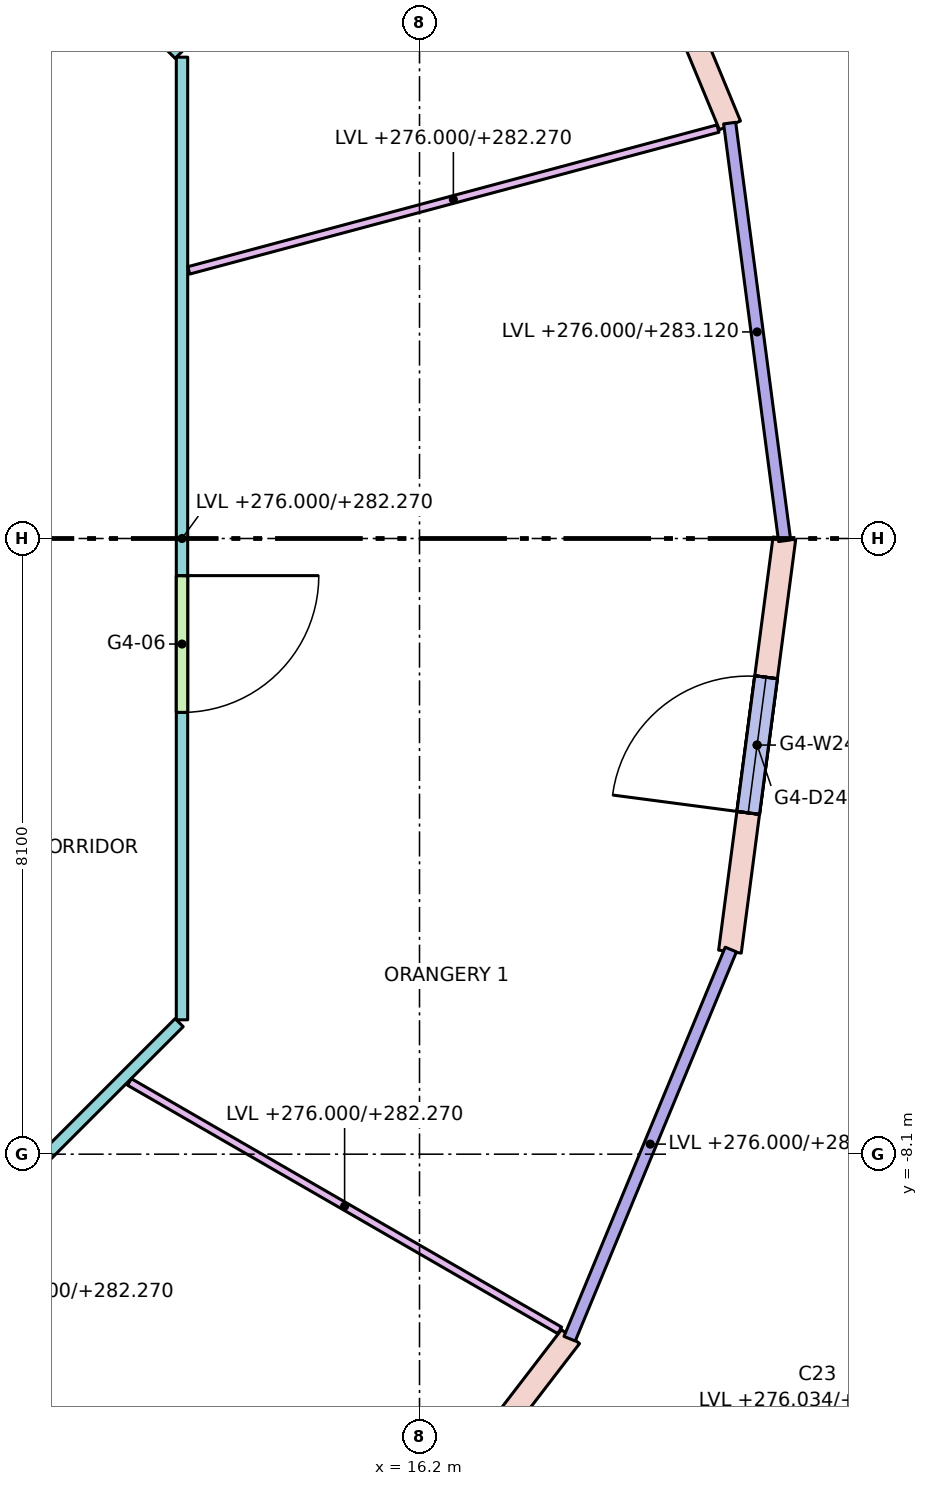
"""IFC4 building model, lengths in metres.
Left out: names, types, materials, properties, quantities, classifications, styles, units other than length and angle.
Written with IfcOpenShell. Run it as: python <this file> out.ifc"""

import sys

from ifc_helpers import new_model, si_unit, direction, frame, frame_2d, origin, place, context, subcontext, project, spatial, rectangle, extrude, element, fill, save


model = new_model("IFC4")
c1 = context("Model", 3, precision=1e-05, world=origin(), true_north=direction((0.0, 1.0)))
c2 = subcontext(c1, "Body", "Model", "MODEL_VIEW")
j1 = project(units=[si_unit("LENGTHUNIT", "METRE"), si_unit("PLANEANGLEUNIT", "RADIAN")], contexts=[c1])
p1 = place(None, origin())
s1 = spatial("IfcSite", under=j1, at=p1, CompositionType="ELEMENT")
p2 = place(p1, origin())
s2 = spatial("IfcBuilding", under=s1, at=p2, CompositionType="ELEMENT")
p3 = place(p2, frame((0.0, 0.0, 276.0)))
s3 = spatial("IfcBuildingStorey", under=s2, at=p3, CompositionType="ELEMENT", Elevation=276.0)
p4 = place(p3, frame((20.284, 5.435, 0.0), z_axis=(0.0, 0.0, 1.0), x_axis=(-0.382688740813, 0.923877333662, 0.0)))
e1 = element("IfcWall", 1, at=p4, inside=s3, PredefinedType="STANDARD", context=c2, shape_type="SweptSolid", body=[
    extrude(rectangle(XDim=5.482, YDim=0.3, at=frame_2d((2.741, 0.0))), origin(), (0.0, 0.0, 1.0), 7.12),
])
p5 = place(p4, frame((1.841, 0.0, 0.0)))
e2 = element("IfcOpeningElement", 2, at=p5, cuts=e1, PredefinedType="OPENING", context=c2, shape_type="SweptSolid", body=[
    extrude(rectangle(XDim=1.8, YDim=2.4, at=frame_2d((0.9, 1.2))), frame((0.0, 0.16, 0.0), z_axis=(0.0, -1.0, 0.0), x_axis=(1.0, 0.0, 0.0)), (0.0, 0.0, 1.0), 0.32),
])
p6 = place(p4, frame((1.841, 0.0, 2.8)))
e3 = element("IfcOpeningElement", 3, at=p6, cuts=e1, PredefinedType="OPENING", context=c2, shape_type="SweptSolid", body=[
    extrude(rectangle(XDim=1.8, YDim=4.1, at=frame_2d((0.9, 2.05))), frame((0.0, 0.16, 0.0), z_axis=(0.0, -1.0, 0.0), x_axis=(1.0, 0.0, 0.0)), (0.0, 0.0, 1.0), 0.32),
])
p7 = place(p3, frame((14.849, -14.849, 0.0), z_axis=(0.0, 0.0, 1.0), x_axis=(0.608784891166, 0.793335336593, 0.0)))
e4 = element("IfcWall", 4, at=p7, inside=s3, PredefinedType="STANDARD", context=c2, shape_type="SweptSolid", body=[
    extrude(rectangle(XDim=5.482, YDim=0.3, at=frame_2d((2.741, 0.0))), origin(), (0.0, 0.0, 1.0), 7.12),
])
p8 = place(p7, frame((1.841, 0.0, 0.0)))
e5 = element("IfcOpeningElement", 5, at=p8, cuts=e4, PredefinedType="OPENING", context=c2, shape_type="SweptSolid", body=[
    extrude(rectangle(XDim=1.8, YDim=2.4, at=frame_2d((0.9, 1.2))), frame((0.0, 0.16, 0.0), z_axis=(0.0, -1.0, 0.0), x_axis=(1.0, 0.0, 0.0)), (0.0, 0.0, 1.0), 0.32),
])
p9 = place(p7, frame((1.841, 0.0, 2.8)))
e6 = element("IfcOpeningElement", 6, at=p9, cuts=e4, PredefinedType="OPENING", context=c2, shape_type="SweptSolid", body=[
    extrude(rectangle(XDim=1.8, YDim=4.1, at=frame_2d((0.9, 2.05))), frame((0.0, 0.16, 0.0), z_axis=(0.0, -1.0, 0.0), x_axis=(1.0, 0.0, 0.0)), (0.0, 0.0, 1.0), 0.32),
])
p10 = place(p3, frame((20.284, -5.435, 0.0), z_axis=(0.0, 0.0, 1.0), x_axis=(0.130527087244, 0.991444743541, 0.0)))
e7 = element("IfcWall", 7, at=p10, inside=s3, PredefinedType="STANDARD", context=c2, shape_type="SweptSolid", body=[
    extrude(rectangle(XDim=5.482, YDim=0.3, at=frame_2d((2.741, 0.0))), origin(), (0.0, 0.0, 1.0), 7.12),
])
p11 = place(p10, frame((1.841, 0.0, 0.0)))
e8 = element("IfcOpeningElement", 8, at=p11, cuts=e7, PredefinedType="OPENING", context=c2, shape_type="SweptSolid", body=[
    extrude(rectangle(XDim=1.8, YDim=2.4, at=frame_2d((0.9, 1.2))), frame((0.0, 0.16, 0.0), z_axis=(0.0, -1.0, 0.0), x_axis=(1.0, 0.0, 0.0)), (0.0, 0.0, 1.0), 0.32),
])
p12 = place(p10, frame((1.841, 0.0, 2.8)))
e9 = element("IfcOpeningElement", 9, at=p12, cuts=e7, PredefinedType="OPENING", context=c2, shape_type="SweptSolid", body=[
    extrude(rectangle(XDim=1.8, YDim=4.1, at=frame_2d((0.9, 2.05))), frame((0.0, 0.16, 0.0), z_axis=(0.0, -1.0, 0.0), x_axis=(1.0, 0.0, 0.0)), (0.0, 0.0, 1.0), 0.32),
])
p13 = place(p3, frame((13.038, -6.369, 0.0), z_axis=(0.0, 0.0, 1.0), x_axis=(-0.707106781187, -0.707106781187, 0.0)))
e10 = element("IfcWall", 10, at=p13, inside=s3, PredefinedType="PARTITIONING", context=c2, shape_type="SweptSolid", body=[
    extrude(rectangle(XDim=6.602, YDim=0.15, at=frame_2d((3.301, 0.0))), origin(), (0.0, 0.0, 1.0), 6.27),
])
p14 = place(p13, frame((3.344, 0.0, 0.0)))
e11 = element("IfcOpeningElement", 11, at=p14, cuts=e10, PredefinedType="OPENING", context=c2, shape_type="SweptSolid", body=[
    extrude(rectangle(XDim=0.9, YDim=2.1, at=frame_2d((0.45, 1.05))), frame((0.0, 0.085, 0.0), z_axis=(0.0, -1.0, 0.0), x_axis=(1.0, 0.0, 0.0)), (0.0, 0.0, 1.0), 0.17),
])
p15 = place(p3, frame((8.369, 11.038, 0.0), z_axis=(0.0, 0.0, 1.0), x_axis=(0.707106781187, -0.707106781187, 0.0)))
e12 = element("IfcWall", 12, at=p15, inside=s3, PredefinedType="PARTITIONING", context=c2, shape_type="SweptSolid", body=[
    extrude(rectangle(XDim=6.602, YDim=0.15, at=frame_2d((3.301, 0.0))), origin(), (0.0, 0.0, 1.0), 6.27),
])
p16 = place(p15, frame((3.719, 0.0, 0.0)))
e13 = element("IfcOpeningElement", 13, at=p16, cuts=e12, PredefinedType="OPENING", context=c2, shape_type="SweptSolid", body=[
    extrude(rectangle(XDim=1.0, YDim=2.1, at=frame_2d((0.5, 1.05))), frame((0.0, 0.085, 0.0), z_axis=(0.0, -1.0, 0.0), x_axis=(1.0, 0.0, 0.0)), (0.0, 0.0, 1.0), 0.17),
])
p17 = place(p3, frame((13.075, 6.332, 0.0), z_axis=(0.0, 0.0, 1.0), x_axis=(0.0, -1.0, 0.0)))
e14 = element("IfcWall", 14, at=p17, inside=s3, PredefinedType="PARTITIONING", context=c2, shape_type="SweptSolid", body=[
    extrude(rectangle(XDim=12.665, YDim=0.15, at=frame_2d((6.332, 0.0))), origin(), (0.0, 0.0, 1.0), 6.27),
])
p18 = place(p17, frame((6.821, 0.0, 0.0)))
e15 = element("IfcOpeningElement", 15, at=p18, cuts=e14, PredefinedType="OPENING", context=c2, shape_type="SweptSolid", body=[
    extrude(rectangle(XDim=1.8, YDim=2.1, at=frame_2d((0.9, 1.05))), frame((0.0, 0.085, 0.0), z_axis=(0.0, -1.0, 0.0), x_axis=(1.0, 0.0, 0.0)), (0.0, 0.0, 1.0), 0.17),
])
p19 = place(p3, frame((13.164, 3.527, 0.0), z_axis=(0.0, 0.0, 1.0), x_axis=(0.965929002199, 0.258807192153, 0.0)))
e16 = element("IfcWall", 16, at=p19, inside=s3, PredefinedType="PARTITIONING", context=c2, shape_type="SweptSolid", body=[
    extrude(rectangle(XDim=7.208, YDim=0.1, at=frame_2d((3.604, 0.0))), origin(), (0.0, 0.0, 1.0), 6.27),
])
p20 = place(p3, frame((12.384, -7.15, 0.0), z_axis=(0.0, 0.0, 1.0), x_axis=(0.866028240128, -0.499995087276, 0.0)))
e17 = element("IfcWall", 17, at=p20, inside=s3, PredefinedType="PARTITIONING", context=c2, shape_type="SweptSolid", body=[
    extrude(rectangle(XDim=6.537, YDim=0.1, at=frame_2d((3.269, 0.0))), origin(), (0.0, 0.0, 1.0), 6.27),
])
p21 = place(p11, origin())
e18 = element("IfcDoor", 18, at=p21, inside=s3, OperationType="SINGLE_SWING_LEFT", PredefinedType="DOOR", context=c2, shape_type="SweptSolid", body=[
    extrude(rectangle(XDim=1.8, YDim=2.4, at=frame_2d((0.9, 1.2))), frame((0.0, 0.025, 0.0), z_axis=(0.0, -1.0, 0.0), x_axis=(1.0, 0.0, 0.0)), (0.0, 0.0, 1.0), 0.05),
])
fill(e8, e18)
p22 = place(p12, origin())
e19 = element("IfcWindow", 19, at=p22, inside=s3, PartitioningType="SINGLE_PANEL", PredefinedType="WINDOW", context=c2, shape_type="SweptSolid", body=[
    extrude(rectangle(XDim=1.8, YDim=4.1, at=frame_2d((0.9, 2.05))), frame((0.0, 0.03, 0.0), z_axis=(0.0, -1.0, 0.0), x_axis=(1.0, 0.0, 0.0)), (0.0, 0.0, 1.0), 0.06),
])
fill(e9, e19)
p23 = place(p18, origin())
e20 = element("IfcDoor", 20, at=p23, inside=s3, OperationType="DOUBLE_DOOR_SINGLE_SWING", PredefinedType="DOOR", context=c2, shape_type="SweptSolid", body=[
    extrude(rectangle(XDim=1.8, YDim=2.1, at=frame_2d((0.9, 1.05))), frame((0.0, 0.025, 0.0), z_axis=(0.0, -1.0, 0.0), x_axis=(1.0, 0.0, 0.0)), (0.0, 0.0, 1.0), 0.05),
])
fill(e15, e20)
save(model, sys.argv[1])
